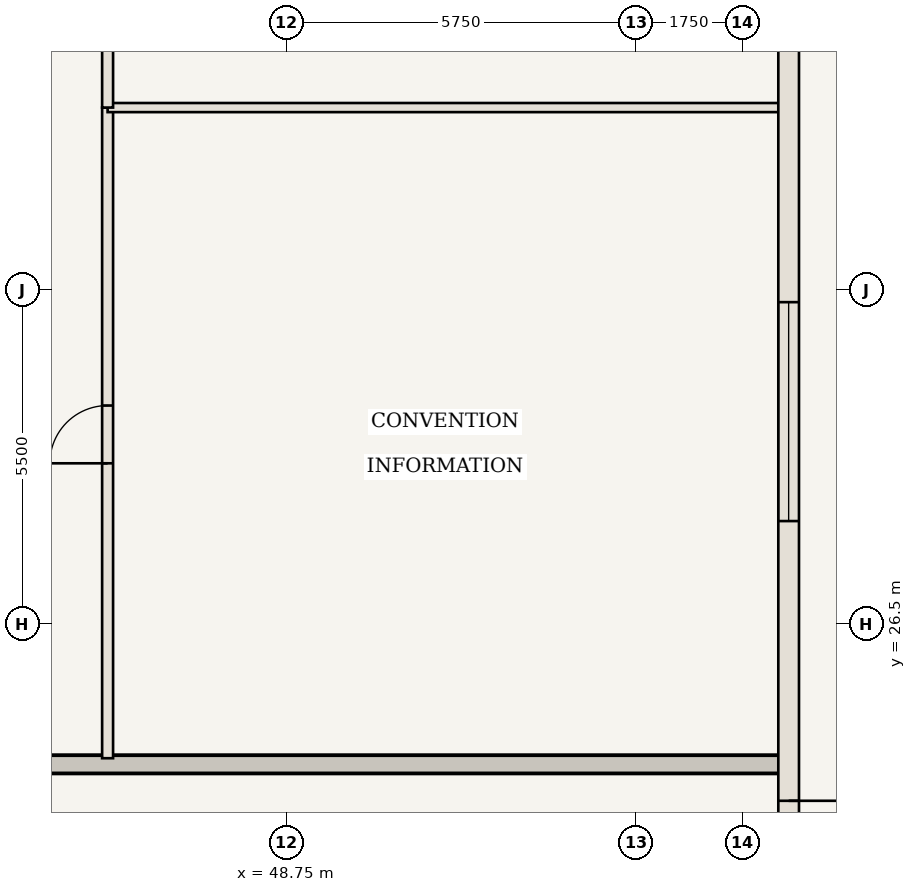
"""IFC4 building model, lengths in metres.
Left out: names, types, materials, properties, quantities, classifications, styles, units other than length and angle.
Written with IfcOpenShell. Run it as: python <this file> out.ifc"""

import sys

from ifc_helpers import new_model, si_unit, direction, frame, frame_2d, origin, place, context, subcontext, project, spatial, rectangle, extrude, element, fill, save


model = new_model("IFC4")
c1 = context("Model", 3, precision=1e-05, world=origin(), true_north=direction((0.0, 1.0)))
c2 = subcontext(c1, "Body", "Model", "MODEL_VIEW")
j1 = project(units=[si_unit("LENGTHUNIT", "METRE"), si_unit("PLANEANGLEUNIT", "RADIAN")], contexts=[c1])
p1 = place(None, origin())
s1 = spatial("IfcSite", under=j1, at=p1, CompositionType="ELEMENT")
p2 = place(p1, origin())
s2 = spatial("IfcBuilding", under=s1, at=p2, CompositionType="ELEMENT")
p3 = place(p2, origin())
s3 = spatial("IfcBuildingStorey", under=s2, at=p3, CompositionType="ELEMENT", Elevation=0.0)
p4 = place(p3, frame((42.9, 24.2, 0.0), z_axis=(0.0, 0.0, 1.0), x_axis=(1.0, 0.0, 0.0)))
e1 = element("IfcWall", 1, at=p4, inside=s3, PredefinedType="SHEAR", context=c2, shape_type="SweptSolid", body=[
    extrude(rectangle(XDim=14.05, YDim=0.3, at=frame_2d((7.025, 0.0))), origin(), (0.0, 0.0, 1.0), 6.41),
])
p5 = place(p3, frame((45.8, 24.3, 0.0), z_axis=(0.0, 0.0, 1.0), x_axis=(0.0, 1.0, 0.0)))
e2 = element("IfcWall", 2, at=p5, inside=s3, PredefinedType="STANDARD", context=c2, shape_type="SweptSolid", body=[
    extrude(rectangle(XDim=10.7, YDim=0.18, at=frame_2d((5.35, 0.0))), origin(), (0.0, 0.0, 1.0), 6.41),
])
p6 = place(p5, frame((4.85, 0.0, 0.0)))
e3 = element("IfcOpeningElement", 3, at=p6, cuts=e2, PredefinedType="OPENING", context=c2, shape_type="SweptSolid", body=[
    extrude(rectangle(XDim=0.95, YDim=2.15, at=frame_2d((0.475, 1.075))), frame((0.0, 0.1, 0.0), z_axis=(0.0, -1.0, 0.0), x_axis=(1.0, 0.0, 0.0)), (0.0, 0.0, 1.0), 0.2),
])
p7 = place(p3, frame((45.8, 35.0, 0.0), z_axis=(0.0, 0.0, 1.0), x_axis=(1.0, 0.0, 0.0)))
e4 = element("IfcWall", 4, at=p7, inside=s3, PredefinedType="STANDARD", context=c2, shape_type="SweptSolid", body=[
    extrude(rectangle(XDim=11.1, YDim=0.15, at=frame_2d((5.55, 0.0))), origin(), (0.0, 0.0, 1.0), 6.41),
])
p8 = place(p3, frame((45.8, 35.0, 0.0), z_axis=(0.0, 0.0, 1.0), x_axis=(0.0, 1.0, 0.0)))
e5 = element("IfcWall", 5, at=p8, inside=s3, PredefinedType="STANDARD", context=c2, shape_type="SweptSolid", body=[
    extrude(rectangle(XDim=10.8, YDim=0.18, at=frame_2d((5.4, 0.0))), origin(), (0.0, 0.0, 1.0), 6.41),
])
p9 = place(p8, frame((4.9, 0.0, 0.0)))
e6 = element("IfcOpeningElement", 6, at=p9, cuts=e5, PredefinedType="OPENING", context=c2, shape_type="SweptSolid", body=[
    extrude(rectangle(XDim=0.95, YDim=2.15, at=frame_2d((0.475, 1.075))), frame((0.0, 0.1, 0.0), z_axis=(0.0, -1.0, 0.0), x_axis=(1.0, 0.0, 0.0)), (0.0, 0.0, 1.0), 0.2),
])
p10 = place(p3, frame((57.0, 36.0, 0.0), z_axis=(0.0, 0.0, 1.0), x_axis=(0.0, -1.0, 0.0)))
e7 = element("IfcWall", 7, at=p10, inside=s3, PredefinedType="USERDEFINED", context=c2, shape_type="SweptSolid", body=[
    extrude(rectangle(XDim=29.0, YDim=0.34, at=frame_2d((14.5, 0.0))), origin(), (0.0, 0.0, 1.0), 5.51),
])
p11 = place(p10, frame((12.4, 0.0, 0.0)))
e8 = element("IfcOpeningElement", 8, at=p11, cuts=e7, PredefinedType="OPENING", context=c2, shape_type="SweptSolid", body=[
    extrude(rectangle(XDim=2.2, YDim=2.4, at=frame_2d((1.1, 1.2))), frame((0.0, 0.18, 0.0), z_axis=(0.0, -1.0, 0.0), x_axis=(1.0, 0.0, 0.0)), (0.0, 0.0, 1.0), 0.36),
])
p12 = place(p10, frame((4.2, 0.0, 0.9)))
e9 = element("IfcOpeningElement", 9, at=p12, cuts=e7, PredefinedType="OPENING", context=c2, shape_type="SweptSolid", body=[
    extrude(rectangle(XDim=3.6, YDim=2.6, at=frame_2d((1.8, 1.3))), frame((0.0, 0.18, 0.0), z_axis=(0.0, -1.0, 0.0), x_axis=(1.0, 0.0, 0.0)), (0.0, 0.0, 1.0), 0.36),
])
p13 = place(p6, origin())
e10 = element("IfcDoor", 10, at=p13, inside=s3, OperationType="SINGLE_SWING_LEFT", PredefinedType="DOOR", context=c2, shape_type="SweptSolid", body=[
    extrude(rectangle(XDim=0.95, YDim=2.15, at=frame_2d((0.475, 1.075))), frame((0.0, 0.025, 0.0), z_axis=(0.0, -1.0, 0.0), x_axis=(1.0, 0.0, 0.0)), (0.0, 0.0, 1.0), 0.05),
])
fill(e3, e10)
p14 = place(p11, origin())
e11 = element("IfcDoor", 11, at=p14, inside=s3, OperationType="DOUBLE_DOOR_SINGLE_SWING", PredefinedType="DOOR", context=c2, shape_type="SweptSolid", body=[
    extrude(rectangle(XDim=2.2, YDim=2.4, at=frame_2d((1.1, 1.2))), frame((0.0, 0.025, 0.0), z_axis=(0.0, -1.0, 0.0), x_axis=(1.0, 0.0, 0.0)), (0.0, 0.0, 1.0), 0.05),
])
fill(e8, e11)
p15 = place(p12, origin())
e12 = element("IfcWindow", 12, at=p15, inside=s3, PartitioningType="SINGLE_PANEL", PredefinedType="WINDOW", context=c2, shape_type="SweptSolid", body=[
    extrude(rectangle(XDim=3.6, YDim=2.6, at=frame_2d((1.8, 1.3))), frame((0.0, 0.03, 0.0), z_axis=(0.0, -1.0, 0.0), x_axis=(1.0, 0.0, 0.0)), (0.0, 0.0, 1.0), 0.06),
])
fill(e9, e12)
save(model, sys.argv[1])
